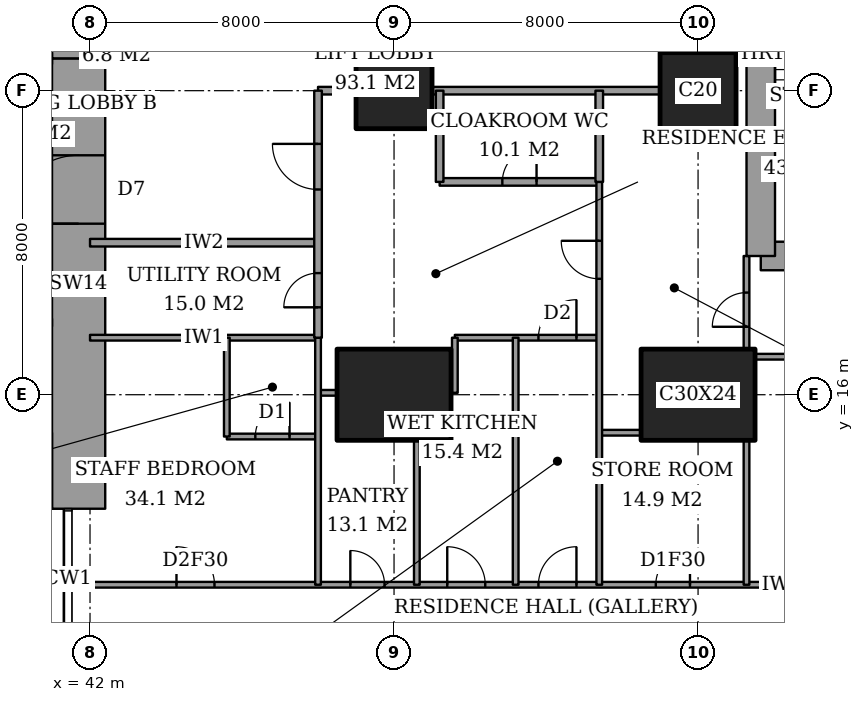
"""IFC4 building model, lengths in metres.
Left out: names, types, materials, properties, quantities, classifications, styles, units other than length and angle.
Written with IfcOpenShell. Run it as: python <this file> out.ifc"""

import sys

from ifc_helpers import new_model, si_unit, direction, frame, frame_2d, origin, origin_2d, place, context, subcontext, project, spatial, rectangle, extrude, element, fill, save


model = new_model("IFC4")
c1 = context("Model", 3, precision=1e-05, world=origin(), true_north=direction((0.0, 1.0)))
c2 = subcontext(c1, "Body", "Model", "MODEL_VIEW")
j1 = project(units=[si_unit("LENGTHUNIT", "METRE"), si_unit("PLANEANGLEUNIT", "RADIAN")], contexts=[c1])
p1 = place(None, origin())
s1 = spatial("IfcSite", under=j1, at=p1, CompositionType="ELEMENT")
p2 = place(p1, origin())
s2 = spatial("IfcBuilding", under=s1, at=p2, CompositionType="ELEMENT")
p3 = place(p2, frame((0.0, 0.0, 168.2)))
s3 = spatial("IfcBuildingStorey", under=s2, at=p3, CompositionType="ELEMENT", Elevation=168.2)
p4 = place(p3, frame((50.0, 16.0, 0.0), z_axis=(0.0, 0.0, 1.0), x_axis=(1.0, 0.0, 0.0)))
e1 = element("IfcColumn", 1, at=p4, inside=s3, PredefinedType="COLUMN", context=c2, shape_type="SweptSolid", body=[
    extrude(rectangle(XDim=3.0, YDim=2.4, at=origin_2d()), origin(), (0.0, 0.0, 1.0), 3.6),
])
p5 = place(p3, frame((50.0, 24.0, 0.0), z_axis=(0.0, 0.0, 1.0), x_axis=(1.0, 0.0, 0.0)))
e2 = element("IfcColumn", 2, at=p5, inside=s3, PredefinedType="COLUMN", context=c2, shape_type="SweptSolid", body=[
    extrude(rectangle(XDim=2.0, YDim=2.0, at=origin_2d()), origin(), (0.0, 0.0, 1.0), 3.6),
])
p6 = place(p3, frame((58.0, 16.0, 0.0), z_axis=(0.0, 0.0, 1.0), x_axis=(1.0, 0.0, 0.0)))
e3 = element("IfcColumn", 3, at=p6, inside=s3, PredefinedType="COLUMN", context=c2, shape_type="SweptSolid", body=[
    extrude(rectangle(XDim=3.0, YDim=2.4, at=origin_2d()), origin(), (0.0, 0.0, 1.0), 3.6),
])
p7 = place(p3, frame((58.0, 24.0, 0.0), z_axis=(0.0, 0.0, 1.0), x_axis=(1.0, 0.0, 0.0)))
e4 = element("IfcColumn", 4, at=p7, inside=s3, PredefinedType="COLUMN", context=c2, shape_type="SweptSolid", body=[
    extrude(rectangle(XDim=2.0, YDim=2.0, at=origin_2d()), origin(), (0.0, 0.0, 1.0), 3.6),
])
p8 = place(p3, frame((41.7, 13.0, 0.0), z_axis=(0.0, 0.0, 1.0), x_axis=(0.0, 1.0, 0.0)))
e5 = element("IfcWall", 5, at=p8, inside=s3, PredefinedType="SHEAR", context=c2, shape_type="SweptSolid", body=[
    extrude(rectangle(XDim=11.85, YDim=1.4, at=frame_2d((5.925, 0.0))), origin(), (0.0, 0.0, 1.0), 3.6),
])
p9 = place(p8, frame((7.5, 0.0, 0.0)))
e6 = element("IfcOpeningElement", 6, at=p9, cuts=e5, PredefinedType="OPENING", context=c2, shape_type="SweptSolid", body=[
    extrude(rectangle(XDim=1.8, YDim=2.4, at=frame_2d((0.9, 1.2))), frame((0.0, 0.71, 0.0), z_axis=(0.0, -1.0, 0.0), x_axis=(1.0, 0.0, 0.0)), (0.0, 0.0, 1.0), 1.42),
])
p10 = place(p3, frame((41.7, 24.85, 0.0), z_axis=(0.0, 0.0, 1.0), x_axis=(0.0, 1.0, 0.0)))
e7 = element("IfcWall", 7, at=p10, inside=s3, PredefinedType="SHEAR", context=c2, shape_type="SweptSolid", body=[
    extrude(rectangle(XDim=10.15, YDim=1.4, at=frame_2d((5.075, 0.0))), origin(), (0.0, 0.0, 1.0), 3.6),
])
p11 = place(p3, frame((59.65, 19.65, 0.0), z_axis=(0.0, 0.0, 1.0), x_axis=(1.0, 0.0, 0.0)))
e8 = element("IfcWall", 8, at=p11, inside=s3, PredefinedType="SHEAR", context=c2, shape_type="SweptSolid", body=[
    extrude(rectangle(XDim=4.45, YDim=0.75, at=frame_2d((2.225, 0.0))), origin(), (0.0, 0.0, 1.0), 3.6),
])
p12 = place(p3, frame((59.65, 28.35, 0.0), z_axis=(0.0, 0.0, 1.0), x_axis=(0.0, -1.0, 0.0)))
e9 = element("IfcWall", 9, at=p12, inside=s3, PredefinedType="SHEAR", context=c2, shape_type="SweptSolid", body=[
    extrude(rectangle(XDim=8.7, YDim=0.75, at=frame_2d((4.35, 0.0))), origin(), (0.0, 0.0, 1.0), 3.6),
])
p13 = place(p12, frame((0.975, 0.0, 0.0)))
e10 = element("IfcOpeningElement", 10, at=p13, cuts=e9, PredefinedType="OPENING", context=c2, shape_type="SweptSolid", body=[
    extrude(rectangle(XDim=1.0, YDim=2.1, at=frame_2d((0.5, 1.05))), frame((0.0, 0.385, 0.0), z_axis=(0.0, -1.0, 0.0), x_axis=(1.0, 0.0, 0.0)), (0.0, 0.0, 1.0), 0.77),
])
p14 = place(p3, frame((41.439, 11.0, 0.0), z_axis=(0.0, 0.0, 1.0), x_axis=(1.0, 0.0, 0.0)))
e11 = element("IfcWall", 11, at=p14, inside=s3, PredefinedType="PARTITIONING", context=c2, shape_type="SweptSolid", body=[
    extrude(rectangle(XDim=25.011, YDim=0.15, at=frame_2d((12.505, 0.0))), origin(), (0.0, 0.0, 1.0), 3.25),
])
p15 = place(p14, frame((12.361, 0.0, 0.0)))
e12 = element("IfcOpeningElement", 12, at=p15, cuts=e11, PredefinedType="OPENING", context=c2, shape_type="SweptSolid", body=[
    extrude(rectangle(XDim=1.0, YDim=2.1, at=frame_2d((0.5, 1.05))), frame((0.0, 0.085, 0.0), z_axis=(0.0, -1.0, 0.0), x_axis=(1.0, 0.0, 0.0)), (0.0, 0.0, 1.0), 0.17),
])
p16 = place(p14, frame((20.924, 0.0, 0.0)))
e13 = element("IfcOpeningElement", 13, at=p16, cuts=e11, PredefinedType="OPENING", context=c2, shape_type="SweptSolid", body=[
    extrude(rectangle(XDim=1.0, YDim=2.1, at=frame_2d((0.5, 1.05))), frame((0.0, 0.085, 0.0), z_axis=(0.0, -1.0, 0.0), x_axis=(1.0, 0.0, 0.0)), (0.0, 0.0, 1.0), 0.17),
])
p17 = place(p14, frame((15.448, 0.0, 0.0)))
e14 = element("IfcOpeningElement", 14, at=p17, cuts=e11, PredefinedType="OPENING", context=c2, shape_type="SweptSolid", body=[
    extrude(rectangle(XDim=0.9, YDim=2.1, at=frame_2d((0.45, 1.05))), frame((0.0, 0.085, 0.0), z_axis=(0.0, -1.0, 0.0), x_axis=(1.0, 0.0, 0.0)), (0.0, 0.0, 1.0), 0.17),
])
p18 = place(p14, frame((9.961, 0.0, 0.0)))
e15 = element("IfcOpeningElement", 15, at=p18, cuts=e11, PredefinedType="OPENING", context=c2, shape_type="SweptSolid", body=[
    extrude(rectangle(XDim=1.0, YDim=2.1, at=frame_2d((0.5, 1.05))), frame((0.0, 0.085, 0.0), z_axis=(0.0, -1.0, 0.0), x_axis=(1.0, 0.0, 0.0)), (0.0, 0.0, 1.0), 0.17),
])
p19 = place(p14, frame((7.411, 0.0, 0.0)))
e16 = element("IfcOpeningElement", 16, at=p19, cuts=e11, PredefinedType="OPENING", context=c2, shape_type="SweptSolid", body=[
    extrude(rectangle(XDim=0.9, YDim=2.1, at=frame_2d((0.45, 1.05))), frame((0.0, 0.085, 0.0), z_axis=(0.0, -1.0, 0.0), x_axis=(1.0, 0.0, 0.0)), (0.0, 0.0, 1.0), 0.17),
])
p20 = place(p14, frame((2.836, 0.0, 0.0)))
e17 = element("IfcOpeningElement", 17, at=p20, cuts=e11, PredefinedType="OPENING", context=c2, shape_type="SweptSolid", body=[
    extrude(rectangle(XDim=1.0, YDim=2.1, at=frame_2d((0.5, 1.05))), frame((0.0, 0.085, 0.0), z_axis=(0.0, -1.0, 0.0), x_axis=(1.0, 0.0, 0.0)), (0.0, 0.0, 1.0), 0.17),
])
p21 = place(p3, frame((45.6, 14.9, 0.0), z_axis=(0.0, 0.0, 1.0), x_axis=(1.0, 0.0, 0.0)))
e18 = element("IfcWall", 18, at=p21, inside=s3, PredefinedType="PARTITIONING", context=c2, shape_type="SweptSolid", body=[
    extrude(rectangle(XDim=2.4, YDim=0.15, at=frame_2d((1.2, 0.0))), origin(), (0.0, 0.0, 1.0), 3.25),
])
p22 = place(p21, frame((0.75, 0.0, 0.0)))
e19 = element("IfcOpeningElement", 19, at=p22, cuts=e18, PredefinedType="OPENING", context=c2, shape_type="SweptSolid", body=[
    extrude(rectangle(XDim=0.9, YDim=2.1, at=frame_2d((0.45, 1.05))), frame((0.0, 0.085, 0.0), z_axis=(0.0, -1.0, 0.0), x_axis=(1.0, 0.0, 0.0)), (0.0, 0.0, 1.0), 0.17),
])
p23 = place(p3, frame((55.4, 15.0, 0.0), z_axis=(0.0, 0.0, 1.0), x_axis=(1.0, 0.0, 0.0)))
e20 = element("IfcWall", 20, at=p23, inside=s3, PredefinedType="PARTITIONING", context=c2, shape_type="SweptSolid", body=[
    extrude(rectangle(XDim=1.1, YDim=0.15, at=frame_2d((0.55, 0.0))), origin(), (0.0, 0.0, 1.0), 3.25),
])
p24 = place(p3, frame((48.0, 16.05, 0.0), z_axis=(0.0, 0.0, 1.0), x_axis=(1.0, 0.0, 0.0)))
e21 = element("IfcWall", 21, at=p24, inside=s3, PredefinedType="PARTITIONING", context=c2, shape_type="SweptSolid", body=[
    extrude(rectangle(XDim=0.5, YDim=0.15, at=frame_2d((0.25, 0.0))), origin(), (0.0, 0.0, 1.0), 3.25),
])
p25 = place(p3, frame((59.5, 17.0, 0.0), z_axis=(0.0, 0.0, 1.0), x_axis=(1.0, 0.0, 0.0)))
e22 = element("IfcWall", 22, at=p25, inside=s3, PredefinedType="PARTITIONING", context=c2, shape_type="SweptSolid", body=[
    extrude(rectangle(XDim=5.15, YDim=0.15, at=frame_2d((2.575, 0.0))), origin(), (0.0, 0.0, 1.0), 3.25),
])
p26 = place(p3, frame((42.0, 17.5, 0.0), z_axis=(0.0, 0.0, 1.0), x_axis=(1.0, 0.0, 0.0)))
e23 = element("IfcWall", 23, at=p26, inside=s3, PredefinedType="PARTITIONING", context=c2, shape_type="SweptSolid", body=[
    extrude(rectangle(XDim=6.0, YDim=0.15, at=frame_2d((3.0, 0.0))), origin(), (0.0, 0.0, 1.0), 3.25),
])
p27 = place(p3, frame((51.6, 17.5, 0.0), z_axis=(0.0, 0.0, 1.0), x_axis=(1.0, 0.0, 0.0)))
e24 = element("IfcWall", 24, at=p27, inside=s3, PredefinedType="PARTITIONING", context=c2, shape_type="SweptSolid", body=[
    extrude(rectangle(XDim=3.8, YDim=0.15, at=frame_2d((1.9, 0.0))), origin(), (0.0, 0.0, 1.0), 3.25),
])
p28 = place(p27, frame((2.2, 0.0, 0.0)))
e25 = element("IfcOpeningElement", 25, at=p28, cuts=e24, PredefinedType="OPENING", context=c2, shape_type="SweptSolid", body=[
    extrude(rectangle(XDim=1.0, YDim=2.1, at=frame_2d((0.5, 1.05))), frame((0.0, 0.085, 0.0), z_axis=(0.0, -1.0, 0.0), x_axis=(1.0, 0.0, 0.0)), (0.0, 0.0, 1.0), 0.17),
])
p29 = place(p3, frame((42.0, 20.0, 0.0), z_axis=(0.0, 0.0, 1.0), x_axis=(1.0, 0.0, 0.0)))
e26 = element("IfcWall", 26, at=p29, inside=s3, PredefinedType="PARTITIONING", context=c2, shape_type="SweptSolid", body=[
    extrude(rectangle(XDim=6.0, YDim=0.2, at=frame_2d((3.0, 0.0))), origin(), (0.0, 0.0, 1.0), 3.25),
])
p30 = place(p3, frame((51.2, 21.6, 0.0), z_axis=(0.0, 0.0, 1.0), x_axis=(1.0, 0.0, 0.0)))
e27 = element("IfcWall", 27, at=p30, inside=s3, PredefinedType="PARTITIONING", context=c2, shape_type="SweptSolid", body=[
    extrude(rectangle(XDim=4.2, YDim=0.2, at=frame_2d((2.1, 0.0))), origin(), (0.0, 0.0, 1.0), 3.25),
])
p31 = place(p30, frame((1.65, 0.0, 0.0)))
e28 = element("IfcOpeningElement", 28, at=p31, cuts=e27, PredefinedType="OPENING", context=c2, shape_type="SweptSolid", body=[
    extrude(rectangle(XDim=0.9, YDim=2.1, at=frame_2d((0.45, 1.05))), frame((0.0, 0.11, 0.0), z_axis=(0.0, -1.0, 0.0), x_axis=(1.0, 0.0, 0.0)), (0.0, 0.0, 1.0), 0.22),
])
p32 = place(p3, frame((48.0, 24.0, 0.0), z_axis=(0.0, 0.0, 1.0), x_axis=(1.0, 0.0, 0.0)))
e29 = element("IfcWall", 29, at=p32, inside=s3, PredefinedType="PARTITIONING", context=c2, shape_type="SweptSolid", body=[
    extrude(rectangle(XDim=1.0, YDim=0.2, at=frame_2d((0.5, 0.0))), origin(), (0.0, 0.0, 1.0), 3.25),
])
p33 = place(p3, frame((51.0, 24.0, 0.0), z_axis=(0.0, 0.0, 1.0), x_axis=(1.0, 0.0, 0.0)))
e30 = element("IfcWall", 30, at=p33, inside=s3, PredefinedType="PARTITIONING", context=c2, shape_type="SweptSolid", body=[
    extrude(rectangle(XDim=6.0, YDim=0.2, at=frame_2d((3.0, 0.0))), origin(), (0.0, 0.0, 1.0), 3.25),
])
p34 = place(p3, frame((45.6, 14.9, 0.0), z_axis=(0.0, 0.0, 1.0), x_axis=(0.0, 1.0, 0.0)))
e31 = element("IfcWall", 31, at=p34, inside=s3, PredefinedType="PARTITIONING", context=c2, shape_type="SweptSolid", body=[
    extrude(rectangle(XDim=2.6, YDim=0.15, at=frame_2d((1.3, 0.0))), origin(), (0.0, 0.0, 1.0), 3.25),
])
p35 = place(p3, frame((48.0, 17.5, 0.0), z_axis=(0.0, 0.0, 1.0), x_axis=(0.0, 1.0, 0.0)))
e32 = element("IfcWall", 32, at=p35, inside=s3, PredefinedType="PARTITIONING", context=c2, shape_type="SweptSolid", body=[
    extrude(rectangle(XDim=6.5, YDim=0.2, at=frame_2d((3.25, 0.0))), origin(), (0.0, 0.0, 1.0), 3.25),
])
p36 = place(p35, frame((3.9, 0.0, 0.0)))
e33 = element("IfcOpeningElement", 33, at=p36, cuts=e32, PredefinedType="OPENING", context=c2, shape_type="SweptSolid", body=[
    extrude(rectangle(XDim=1.2, YDim=2.4, at=frame_2d((0.6, 1.2))), frame((0.0, 0.11, 0.0), z_axis=(0.0, -1.0, 0.0), x_axis=(1.0, 0.0, 0.0)), (0.0, 0.0, 1.0), 0.22),
])
p37 = place(p35, frame((0.8, 0.0, 0.0)))
e34 = element("IfcOpeningElement", 34, at=p37, cuts=e32, PredefinedType="OPENING", context=c2, shape_type="SweptSolid", body=[
    extrude(rectangle(XDim=0.9, YDim=2.1, at=frame_2d((0.45, 1.05))), frame((0.0, 0.11, 0.0), z_axis=(0.0, -1.0, 0.0), x_axis=(1.0, 0.0, 0.0)), (0.0, 0.0, 1.0), 0.22),
])
p38 = place(p3, frame((48.0, 11.0, 0.0), z_axis=(0.0, 0.0, 1.0), x_axis=(0.0, 1.0, 0.0)))
e35 = element("IfcWall", 35, at=p38, inside=s3, PredefinedType="PARTITIONING", context=c2, shape_type="SweptSolid", body=[
    extrude(rectangle(XDim=6.5, YDim=0.15, at=frame_2d((3.25, 0.0))), origin(), (0.0, 0.0, 1.0), 3.25),
])
p39 = place(p3, frame((50.6, 11.0, 0.0), z_axis=(0.0, 0.0, 1.0), x_axis=(0.0, 1.0, 0.0)))
e36 = element("IfcWall", 36, at=p39, inside=s3, PredefinedType="PARTITIONING", context=c2, shape_type="SweptSolid", body=[
    extrude(rectangle(XDim=3.8, YDim=0.15, at=frame_2d((1.9, 0.0))), origin(), (0.0, 0.0, 1.0), 3.25),
])
p40 = place(p3, frame((51.2, 21.6, 0.0), z_axis=(0.0, 0.0, 1.0), x_axis=(0.0, 1.0, 0.0)))
e37 = element("IfcWall", 37, at=p40, inside=s3, PredefinedType="PARTITIONING", context=c2, shape_type="SweptSolid", body=[
    extrude(rectangle(XDim=2.4, YDim=0.2, at=frame_2d((1.2, 0.0))), origin(), (0.0, 0.0, 1.0), 3.25),
])
p41 = place(p3, frame((51.6, 16.05, 0.0), z_axis=(0.0, 0.0, 1.0), x_axis=(0.0, 1.0, 0.0)))
e38 = element("IfcWall", 38, at=p41, inside=s3, PredefinedType="PARTITIONING", context=c2, shape_type="SweptSolid", body=[
    extrude(rectangle(XDim=1.45, YDim=0.15, at=frame_2d((0.725, 0.0))), origin(), (0.0, 0.0, 1.0), 3.25),
])
p42 = place(p3, frame((53.2, 11.0, 0.0), z_axis=(0.0, 0.0, 1.0), x_axis=(0.0, 1.0, 0.0)))
e39 = element("IfcWall", 39, at=p42, inside=s3, PredefinedType="PARTITIONING", context=c2, shape_type="SweptSolid", body=[
    extrude(rectangle(XDim=6.5, YDim=0.15, at=frame_2d((3.25, 0.0))), origin(), (0.0, 0.0, 1.0), 3.25),
])
p43 = place(p3, frame((55.4, 21.6, 0.0), z_axis=(0.0, 0.0, 1.0), x_axis=(0.0, 1.0, 0.0)))
e40 = element("IfcWall", 40, at=p43, inside=s3, PredefinedType="PARTITIONING", context=c2, shape_type="SweptSolid", body=[
    extrude(rectangle(XDim=2.4, YDim=0.2, at=frame_2d((1.2, 0.0))), origin(), (0.0, 0.0, 1.0), 3.25),
])
p44 = place(p3, frame((55.4, 11.0, 0.0), z_axis=(0.0, 0.0, 1.0), x_axis=(0.0, 1.0, 0.0)))
e41 = element("IfcWall", 41, at=p44, inside=s3, PredefinedType="PARTITIONING", context=c2, shape_type="SweptSolid", body=[
    extrude(rectangle(XDim=10.6, YDim=0.15, at=frame_2d((5.3, 0.0))), origin(), (0.0, 0.0, 1.0), 3.25),
])
p45 = place(p44, frame((8.05, 0.0, 0.0)))
e42 = element("IfcOpeningElement", 42, at=p45, cuts=e41, PredefinedType="OPENING", context=c2, shape_type="SweptSolid", body=[
    extrude(rectangle(XDim=1.0, YDim=2.1, at=frame_2d((0.5, 1.05))), frame((0.0, 0.085, 0.0), z_axis=(0.0, -1.0, 0.0), x_axis=(1.0, 0.0, 0.0)), (0.0, 0.0, 1.0), 0.17),
])
p46 = place(p3, frame((59.275, 11.0, 0.0), z_axis=(0.0, 0.0, 1.0), x_axis=(0.0, 1.0, 0.0)))
e43 = element("IfcWall", 43, at=p46, inside=s3, PredefinedType="PARTITIONING", context=c2, shape_type="SweptSolid", body=[
    extrude(rectangle(XDim=3.8, YDim=0.15, at=frame_2d((1.9, 0.0))), origin(), (0.0, 0.0, 1.0), 3.25),
])
p47 = place(p3, frame((59.275, 17.2, 0.0), z_axis=(0.0, 0.0, 1.0), x_axis=(0.0, 1.0, 0.0)))
e44 = element("IfcWall", 44, at=p47, inside=s3, PredefinedType="PARTITIONING", context=c2, shape_type="SweptSolid", body=[
    extrude(rectangle(XDim=2.45, YDim=0.15, at=frame_2d((1.225, 0.0))), origin(), (0.0, 0.0, 1.0), 3.25),
])
p48 = place(p47, frame((0.587, 0.0, 0.0)))
e45 = element("IfcOpeningElement", 45, at=p48, cuts=e44, PredefinedType="OPENING", context=c2, shape_type="SweptSolid", body=[
    extrude(rectangle(XDim=0.9, YDim=2.1, at=frame_2d((0.45, 1.05))), frame((0.0, 0.085, 0.0), z_axis=(0.0, -1.0, 0.0), x_axis=(1.0, 0.0, 0.0)), (0.0, 0.0, 1.0), 0.17),
])
p49 = place(p3, frame((28.3, 17.9, 0.0), z_axis=(0.0, 0.0, 1.0), x_axis=(1.0, 0.0, 0.0)))
e46 = element("IfcWall", 46, at=p49, inside=s3, PredefinedType="PARTITIONING", context=c2, shape_type="SweptSolid", body=[
    extrude(rectangle(XDim=12.7, YDim=0.2, at=frame_2d((6.35, 0.0))), origin(), (0.0, 0.0, 1.0), 3.6),
])
p50 = place(p49, frame((0.95, 0.0, 0.0)))
e47 = element("IfcOpeningElement", 47, at=p50, cuts=e46, PredefinedType="OPENING", context=c2, shape_type="SweptSolid", body=[
    extrude(rectangle(XDim=1.1, YDim=2.1, at=frame_2d((0.55, 1.05))), frame((0.0, 0.11, 0.0), z_axis=(0.0, -1.0, 0.0), x_axis=(1.0, 0.0, 0.0)), (0.0, 0.0, 1.0), 0.22),
])
p51 = place(p49, frame((4.15, 0.0, 0.0)))
e48 = element("IfcOpeningElement", 48, at=p51, cuts=e46, PredefinedType="OPENING", context=c2, shape_type="SweptSolid", body=[
    extrude(rectangle(XDim=1.1, YDim=2.1, at=frame_2d((0.55, 1.05))), frame((0.0, 0.11, 0.0), z_axis=(0.0, -1.0, 0.0), x_axis=(1.0, 0.0, 0.0)), (0.0, 0.0, 1.0), 0.22),
])
p52 = place(p49, frame((7.35, 0.0, 0.0)))
e49 = element("IfcOpeningElement", 49, at=p52, cuts=e46, PredefinedType="OPENING", context=c2, shape_type="SweptSolid", body=[
    extrude(rectangle(XDim=1.1, YDim=2.1, at=frame_2d((0.55, 1.05))), frame((0.0, 0.11, 0.0), z_axis=(0.0, -1.0, 0.0), x_axis=(1.0, 0.0, 0.0)), (0.0, 0.0, 1.0), 0.22),
])
p53 = place(p49, frame((10.6, 0.0, 0.0)))
e50 = element("IfcOpeningElement", 50, at=p53, cuts=e46, PredefinedType="OPENING", context=c2, shape_type="SweptSolid", body=[
    extrude(rectangle(XDim=1.2, YDim=2.1, at=frame_2d((0.6, 1.05))), frame((0.0, 0.11, 0.0), z_axis=(0.0, -1.0, 0.0), x_axis=(1.0, 0.0, 0.0)), (0.0, 0.0, 1.0), 0.22),
])
p54 = place(p15, origin())
e51 = element("IfcDoor", 51, at=p54, inside=s3, OperationType="SINGLE_SWING_LEFT", PredefinedType="DOOR", context=c2, shape_type="SweptSolid", body=[
    extrude(rectangle(XDim=1.0, YDim=2.1, at=frame_2d((0.5, 1.05))), frame((0.0, 0.025, 0.0), z_axis=(0.0, -1.0, 0.0), x_axis=(1.0, 0.0, 0.0)), (0.0, 0.0, 1.0), 0.05),
])
fill(e12, e51)
p55 = place(p48, origin())
e52 = element("IfcDoor", 52, at=p55, inside=s3, OperationType="SINGLE_SWING_RIGHT", PredefinedType="DOOR", context=c2, shape_type="SweptSolid", body=[
    extrude(rectangle(XDim=0.9, YDim=2.1, at=frame_2d((0.45, 1.05))), frame((0.0, 0.025, 0.0), z_axis=(0.0, -1.0, 0.0), x_axis=(1.0, 0.0, 0.0)), (0.0, 0.0, 1.0), 0.05),
])
fill(e45, e52)
p56 = place(p17, origin())
e53 = element("IfcDoor", 53, at=p56, inside=s3, OperationType="SINGLE_SWING_LEFT", PredefinedType="DOOR", context=c2, shape_type="SweptSolid", body=[
    extrude(rectangle(XDim=0.9, YDim=2.1, at=frame_2d((0.45, 1.05))), frame((0.0, 0.025, 0.0), z_axis=(0.0, -1.0, 0.0), x_axis=(1.0, 0.0, 0.0)), (0.0, 0.0, 1.0), 0.05),
])
fill(e14, e53)
p57 = place(p45, origin())
e54 = element("IfcDoor", 54, at=p57, inside=s3, OperationType="SINGLE_SWING_LEFT", PredefinedType="DOOR", context=c2, shape_type="SweptSolid", body=[
    extrude(rectangle(XDim=1.0, YDim=2.1, at=frame_2d((0.5, 1.05))), frame((0.0, 0.025, 0.0), z_axis=(0.0, -1.0, 0.0), x_axis=(1.0, 0.0, 0.0)), (0.0, 0.0, 1.0), 0.05),
])
fill(e42, e54)
p58 = place(p31, origin())
e55 = element("IfcDoor", 55, at=p58, inside=s3, OperationType="SINGLE_SWING_LEFT", PredefinedType="DOOR", context=c2, shape_type="SweptSolid", body=[
    extrude(rectangle(XDim=0.9, YDim=2.1, at=frame_2d((0.45, 1.05))), frame((0.0, 0.025, 0.0), z_axis=(0.0, -1.0, 0.0), x_axis=(1.0, 0.0, 0.0)), (0.0, 0.0, 1.0), 0.05),
])
fill(e28, e55)
p59 = place(p36, origin())
e56 = element("IfcDoor", 56, at=p59, inside=s3, OperationType="SINGLE_SWING_LEFT", PredefinedType="DOOR", context=c2, shape_type="SweptSolid", body=[
    extrude(rectangle(XDim=1.2, YDim=2.4, at=frame_2d((0.6, 1.2))), frame((0.0, 0.025, 0.0), z_axis=(0.0, -1.0, 0.0), x_axis=(1.0, 0.0, 0.0)), (0.0, 0.0, 1.0), 0.05),
])
fill(e33, e56)
p60 = place(p28, origin())
e57 = element("IfcDoor", 57, at=p60, inside=s3, OperationType="SINGLE_SWING_LEFT", PredefinedType="DOOR", context=c2, shape_type="SweptSolid", body=[
    extrude(rectangle(XDim=1.0, YDim=2.1, at=frame_2d((0.5, 1.05))), frame((0.0, 0.025, 0.0), z_axis=(0.0, -1.0, 0.0), x_axis=(1.0, 0.0, 0.0)), (0.0, 0.0, 1.0), 0.05),
])
fill(e25, e57)
p61 = place(p18, origin())
e58 = element("IfcDoor", 58, at=p61, inside=s3, OperationType="SINGLE_SWING_RIGHT", PredefinedType="DOOR", context=c2, shape_type="SweptSolid", body=[
    extrude(rectangle(XDim=1.0, YDim=2.1, at=frame_2d((0.5, 1.05))), frame((0.0, 0.025, 0.0), z_axis=(0.0, -1.0, 0.0), x_axis=(1.0, 0.0, 0.0)), (0.0, 0.0, 1.0), 0.05),
])
fill(e15, e58)
p62 = place(p19, origin())
e59 = element("IfcDoor", 59, at=p62, inside=s3, OperationType="SINGLE_SWING_RIGHT", PredefinedType="DOOR", context=c2, shape_type="SweptSolid", body=[
    extrude(rectangle(XDim=0.9, YDim=2.1, at=frame_2d((0.45, 1.05))), frame((0.0, 0.025, 0.0), z_axis=(0.0, -1.0, 0.0), x_axis=(1.0, 0.0, 0.0)), (0.0, 0.0, 1.0), 0.05),
])
fill(e16, e59)
p63 = place(p22, origin())
e60 = element("IfcDoor", 60, at=p63, inside=s3, OperationType="SINGLE_SWING_LEFT", PredefinedType="DOOR", context=c2, shape_type="SweptSolid", body=[
    extrude(rectangle(XDim=0.9, YDim=2.1, at=frame_2d((0.45, 1.05))), frame((0.0, 0.025, 0.0), z_axis=(0.0, -1.0, 0.0), x_axis=(1.0, 0.0, 0.0)), (0.0, 0.0, 1.0), 0.05),
])
fill(e19, e60)
p64 = place(p20, origin())
e61 = element("IfcDoor", 61, at=p64, inside=s3, OperationType="SINGLE_SWING_RIGHT", PredefinedType="DOOR", context=c2, shape_type="SweptSolid", body=[
    extrude(rectangle(XDim=1.0, YDim=2.1, at=frame_2d((0.5, 1.05))), frame((0.0, 0.025, 0.0), z_axis=(0.0, -1.0, 0.0), x_axis=(1.0, 0.0, 0.0)), (0.0, 0.0, 1.0), 0.05),
])
fill(e17, e61)
p65 = place(p37, origin())
e62 = element("IfcDoor", 62, at=p65, inside=s3, OperationType="SINGLE_SWING_RIGHT", PredefinedType="DOOR", context=c2, shape_type="SweptSolid", body=[
    extrude(rectangle(XDim=0.9, YDim=2.1, at=frame_2d((0.45, 1.05))), frame((0.0, 0.025, 0.0), z_axis=(0.0, -1.0, 0.0), x_axis=(1.0, 0.0, 0.0)), (0.0, 0.0, 1.0), 0.05),
])
fill(e34, e62)
p66 = place(p9, origin())
e63 = element("IfcDoor", 63, at=p66, inside=s3, OperationType="DOUBLE_DOOR_DOUBLE_SWING", PredefinedType="DOOR", context=c2, shape_type="SweptSolid", body=[
    extrude(rectangle(XDim=1.8, YDim=2.4, at=frame_2d((0.9, 1.2))), frame((0.0, 0.025, 0.0), z_axis=(0.0, -1.0, 0.0), x_axis=(1.0, 0.0, 0.0)), (0.0, 0.0, 1.0), 0.05),
])
fill(e6, e63)
save(model, sys.argv[1])
